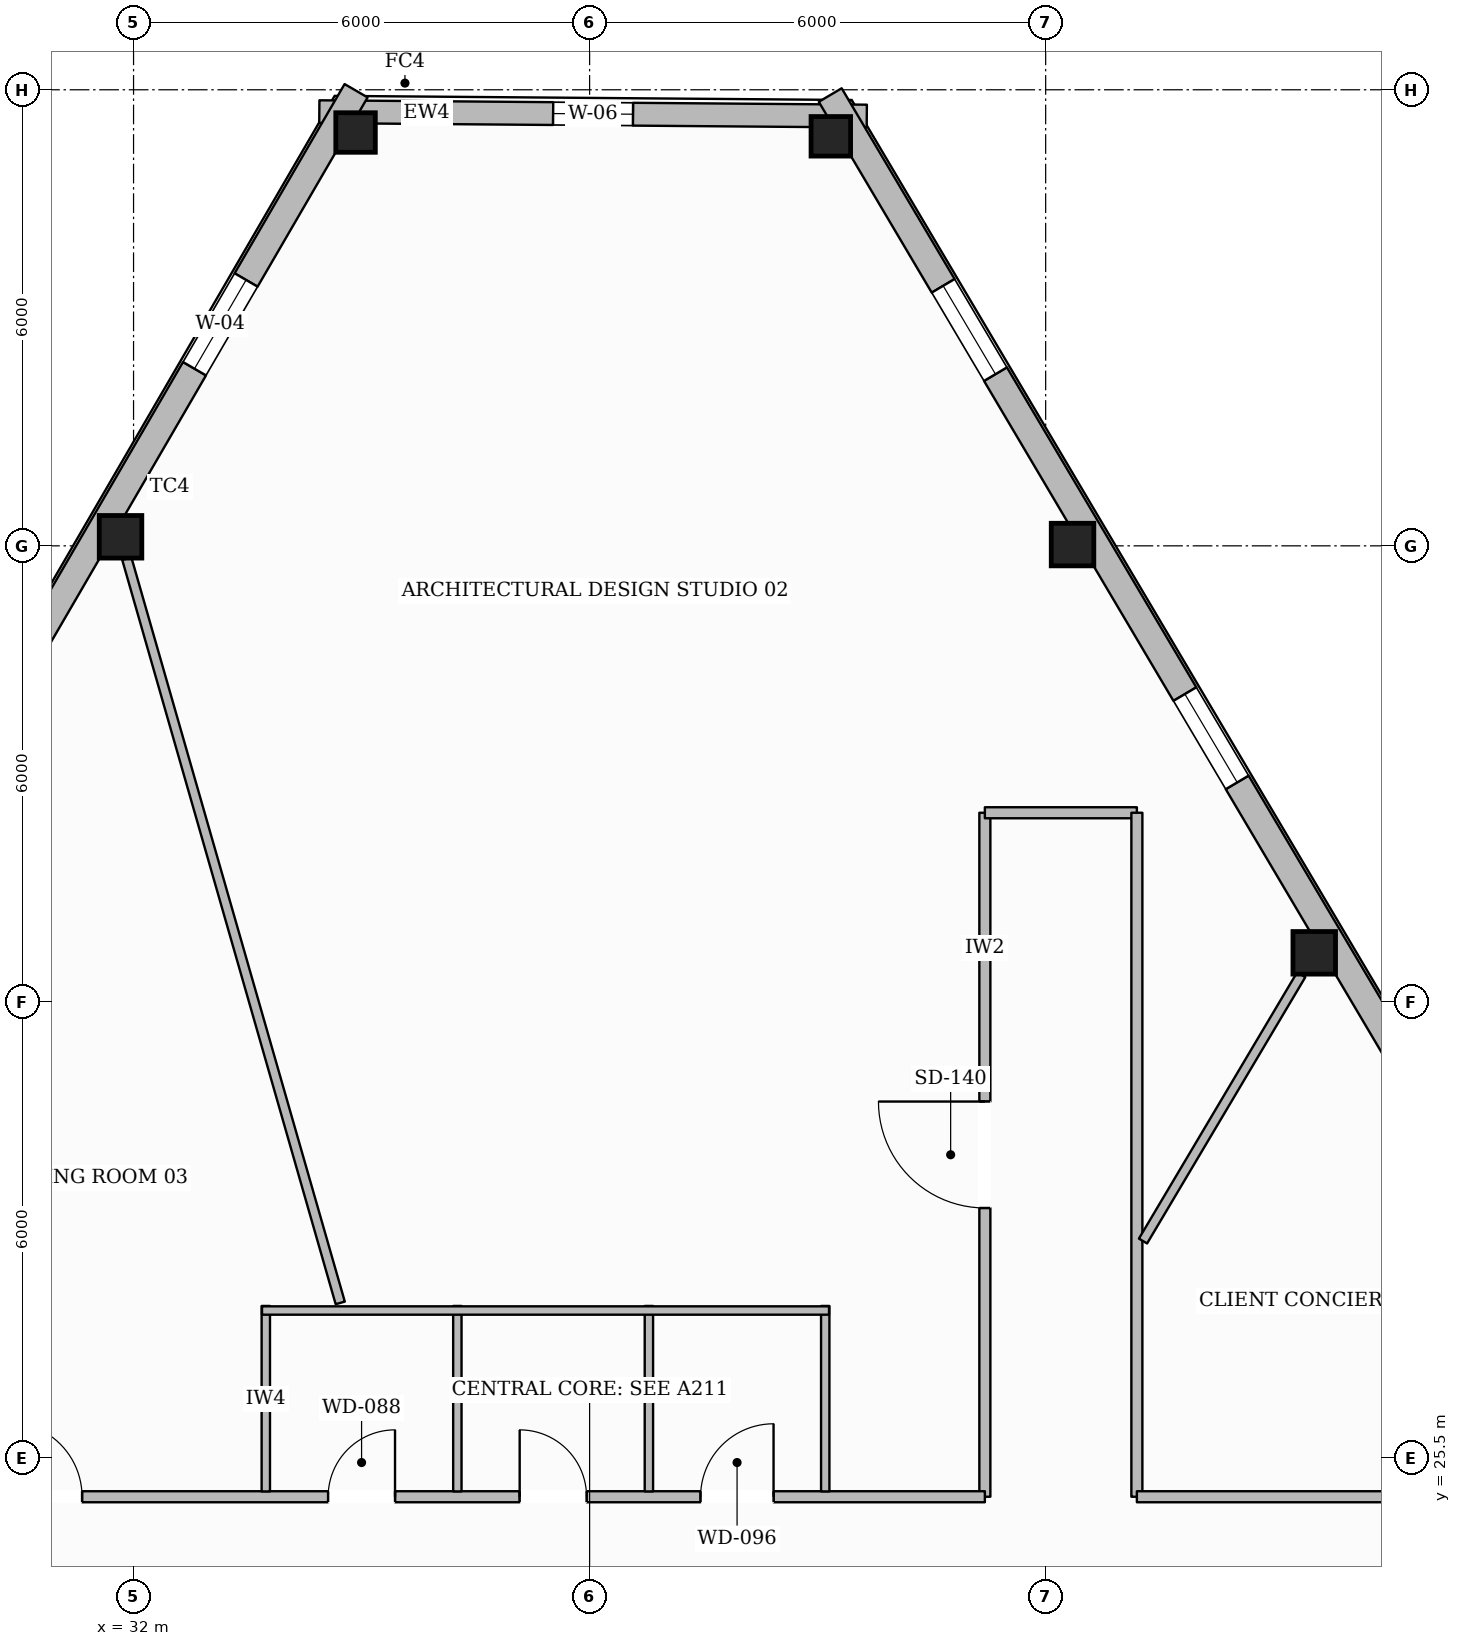
"""IFC4 building model, lengths in metres.
Left out: names, types, materials, properties, quantities, classifications, styles, units other than length and angle.
Written with IfcOpenShell. Run it as: python <this file> out.ifc"""

import sys

from ifc_helpers import new_model, si_unit, direction, frame, frame_2d, origin, origin_2d, place, context, subcontext, project, spatial, rectangle, hollow_rectangle, extrude, element, fill, save


model = new_model("IFC4")
c1 = context("Model", 3, precision=1e-05, world=origin(), true_north=direction((0.0, 1.0)))
c2 = subcontext(c1, "Body", "Model", "MODEL_VIEW")
j1 = project(units=[si_unit("LENGTHUNIT", "METRE"), si_unit("PLANEANGLEUNIT", "RADIAN")], contexts=[c1])
p1 = place(None, origin())
s1 = spatial("IfcSite", under=j1, at=p1, CompositionType="ELEMENT")
p2 = place(p1, origin())
s2 = spatial("IfcBuilding", under=s1, at=p2, CompositionType="ELEMENT")
p3 = place(p2, frame((0.0, 0.0, 266.45)))
s3 = spatial("IfcBuildingStorey", under=s2, at=p3, CompositionType="ELEMENT", Elevation=266.45)
p4 = place(p3, frame((34.921, 42.938, 0.0), z_axis=(0.0, 0.0, 1.0), x_axis=(1.0, 0.0, 0.0)))
e1 = element("IfcColumn", 1, at=p4, inside=s3, PredefinedType="COLUMN", context=c2, shape_type="SweptSolid", body=[
    extrude(hollow_rectangle(XDim=0.52, YDim=0.52, WallThickness=0.024, at=origin_2d()), origin(), (0.0, 0.0, 1.0), 3.61),
])
for number, where, z_axis, x_axis in (
    (2, (31.829, 37.619, 0.0), (0.0, 0.0, 1.0), (1.0, 0.0, 0.0)),
    (3, (47.533, 32.146, 0.0), (0.0, 0.0, 1.0), (1.0, 0.0, 0.0)),
    (4, (44.354, 37.517, 0.0), (0.0, 0.0, 1.0), (1.0, 0.0, 0.0)),
):
    element("IfcColumn", number, at=place(p3, frame(where, z_axis=z_axis, x_axis=x_axis)), inside=s3, PredefinedType="COLUMN", context=c2, shape_type="SweptSolid", body=[
        extrude(hollow_rectangle(XDim=0.56, YDim=0.56, WallThickness=0.025, at=origin_2d()), origin(), (0.0, 0.0, 1.0), 3.61),
    ])
p5 = place(p3, frame((41.173, 42.888, 0.0), z_axis=(0.0, 0.0, 1.0), x_axis=(1.0, 0.0, 0.0)))
e5 = element("IfcColumn", 5, at=p5, inside=s3, PredefinedType="COLUMN", context=c2, shape_type="SweptSolid", body=[
    extrude(hollow_rectangle(XDim=0.52, YDim=0.52, WallThickness=0.024, at=origin_2d()), origin(), (0.0, 0.0, 1.0), 3.61),
])
p6 = place(p3, frame((34.444, 43.211, 0.0), z_axis=(0.0, 0.0, 1.0), x_axis=(0.999968003705, -0.007999472861, 0.0)))
e6 = element("IfcWall", 6, at=p6, inside=s3, PredefinedType="STANDARD", context=c2, shape_type="SweptSolid", body=[
    extrude(rectangle(XDim=7.203, YDim=0.3, at=frame_2d((3.601, 0.0))), origin(), (0.0, 0.0, 1.0), 3.196),
])
p7 = place(p6, frame((3.076, 0.0, 0.65)))
e7 = element("IfcOpeningElement", 7, at=p7, cuts=e6, PredefinedType="OPENING", context=c2, shape_type="SweptSolid", body=[
    extrude(rectangle(XDim=1.05, YDim=1.7, at=frame_2d((0.525, 0.85))), frame((0.0, 0.16, 0.0), z_axis=(0.0, -1.0, 0.0), x_axis=(1.0, 0.0, 0.0)), (0.0, 0.0, 1.0), 0.32),
])
p8 = place(p3, frame((15.894, 10.745, 0.0), z_axis=(0.0, 0.0, 1.0), x_axis=(0.502581466224, 0.864529854781, 0.0)))
e8 = element("IfcWall", 8, at=p8, inside=s3, PredefinedType="STANDARD", context=c2, shape_type="SweptSolid", body=[
    extrude(rectangle(XDim=37.873, YDim=0.35, at=frame_2d((18.937, 0.0))), origin(), (0.0, 0.0, 1.0), 3.196),
])
p9 = place(p8, frame((33.643, 0.0, 0.65)))
e9 = element("IfcOpeningElement", 9, at=p9, cuts=e8, PredefinedType="OPENING", context=c2, shape_type="SweptSolid", body=[
    extrude(rectangle(XDim=1.35, YDim=1.75, at=frame_2d((0.675, 0.875))), frame((0.0, 0.185, 0.0), z_axis=(0.0, -1.0, 0.0), x_axis=(1.0, 0.0, 0.0)), (0.0, 0.0, 1.0), 0.37),
])
p10 = place(p8, frame((27.491, 0.0, 0.65)))
e10 = element("IfcOpeningElement", 10, at=p10, cuts=e8, PredefinedType="OPENING", context=c2, shape_type="SweptSolid", body=[
    extrude(rectangle(XDim=1.35, YDim=1.75, at=frame_2d((0.675, 0.875))), frame((0.0, 0.185, 0.0), z_axis=(0.0, -1.0, 0.0), x_axis=(1.0, 0.0, 0.0)), (0.0, 0.0, 1.0), 0.37),
])
p11 = place(p8, frame((15.187, 0.0, 0.65)))
e11 = element("IfcOpeningElement", 11, at=p11, cuts=e8, PredefinedType="OPENING", context=c2, shape_type="SweptSolid", body=[
    extrude(rectangle(XDim=1.35, YDim=1.75, at=frame_2d((0.675, 0.875))), frame((0.0, 0.185, 0.0), z_axis=(0.0, -1.0, 0.0), x_axis=(1.0, 0.0, 0.0)), (0.0, 0.0, 1.0), 0.37),
])
p12 = place(p8, frame((9.035, 0.0, 0.65)))
e12 = element("IfcOpeningElement", 12, at=p12, cuts=e8, PredefinedType="OPENING", context=c2, shape_type="SweptSolid", body=[
    extrude(rectangle(XDim=1.35, YDim=1.75, at=frame_2d((0.675, 0.875))), frame((0.0, 0.185, 0.0), z_axis=(0.0, -1.0, 0.0), x_axis=(1.0, 0.0, 0.0)), (0.0, 0.0, 1.0), 0.37),
])
p13 = place(p8, frame((2.883, 0.0, 0.65)))
e13 = element("IfcOpeningElement", 13, at=p13, cuts=e8, PredefinedType="OPENING", context=c2, shape_type="SweptSolid", body=[
    extrude(rectangle(XDim=1.35, YDim=1.75, at=frame_2d((0.675, 0.875))), frame((0.0, 0.185, 0.0), z_axis=(0.0, -1.0, 0.0), x_axis=(1.0, 0.0, 0.0)), (0.0, 0.0, 1.0), 0.37),
])
p14 = place(p3, frame((41.166, 43.431, 0.0), z_axis=(0.0, 0.0, 1.0), x_axis=(0.50946847144, -0.860489323936, 0.0)))
e14 = element("IfcWall", 14, at=p14, inside=s3, PredefinedType="STANDARD", context=c2, shape_type="SweptSolid", body=[
    extrude(rectangle(XDim=38.404, YDim=0.35, at=frame_2d((19.202, 0.0))), origin(), (0.0, 0.0, 1.0), 3.196),
])
p15 = place(p14, frame((34.126, 0.0, 0.65)))
e15 = element("IfcOpeningElement", 15, at=p15, cuts=e14, PredefinedType="OPENING", context=c2, shape_type="SweptSolid", body=[
    extrude(rectangle(XDim=1.35, YDim=1.75, at=frame_2d((0.675, 0.875))), frame((0.0, 0.185, 0.0), z_axis=(0.0, -1.0, 0.0), x_axis=(1.0, 0.0, 0.0)), (0.0, 0.0, 1.0), 0.37),
])
p16 = place(p14, frame((27.884, 0.0, 0.65)))
e16 = element("IfcOpeningElement", 16, at=p16, cuts=e14, PredefinedType="OPENING", context=c2, shape_type="SweptSolid", body=[
    extrude(rectangle(XDim=1.35, YDim=1.75, at=frame_2d((0.675, 0.875))), frame((0.0, 0.185, 0.0), z_axis=(0.0, -1.0, 0.0), x_axis=(1.0, 0.0, 0.0)), (0.0, 0.0, 1.0), 0.37),
])
p17 = place(p14, frame((15.401, 0.0, 0.65)))
e17 = element("IfcOpeningElement", 17, at=p17, cuts=e14, PredefinedType="OPENING", context=c2, shape_type="SweptSolid", body=[
    extrude(rectangle(XDim=1.35, YDim=1.75, at=frame_2d((0.675, 0.875))), frame((0.0, 0.185, 0.0), z_axis=(0.0, -1.0, 0.0), x_axis=(1.0, 0.0, 0.0)), (0.0, 0.0, 1.0), 0.37),
])
p18 = place(p14, frame((9.159, 0.0, 0.65)))
e18 = element("IfcOpeningElement", 18, at=p18, cuts=e14, PredefinedType="OPENING", context=c2, shape_type="SweptSolid", body=[
    extrude(rectangle(XDim=1.35, YDim=1.75, at=frame_2d((0.675, 0.875))), frame((0.0, 0.185, 0.0), z_axis=(0.0, -1.0, 0.0), x_axis=(1.0, 0.0, 0.0)), (0.0, 0.0, 1.0), 0.37),
])
p19 = place(p14, frame((2.917, 0.0, 0.65)))
e19 = element("IfcOpeningElement", 19, at=p19, cuts=e14, PredefinedType="OPENING", context=c2, shape_type="SweptSolid", body=[
    extrude(rectangle(XDim=1.35, YDim=1.75, at=frame_2d((0.675, 0.875))), frame((0.0, 0.185, 0.0), z_axis=(0.0, -1.0, 0.0), x_axis=(1.0, 0.0, 0.0)), (0.0, 0.0, 1.0), 0.37),
])
p20 = place(p3, frame((43.2, 24.99, 0.0), z_axis=(0.0, 0.0, 1.0), x_axis=(0.0, 1.0, 0.0)))
e20 = element("IfcWall", 20, at=p20, inside=s3, PredefinedType="PARTITIONING", context=c2, shape_type="SweptSolid", body=[
    extrude(rectangle(XDim=8.999, YDim=0.145, at=frame_2d((4.499, 0.0))), origin(), (0.0, 0.0, 1.0), 3.61),
])
p21 = place(p20, frame((3.799, 0.0, 0.0)))
e21 = element("IfcOpeningElement", 21, at=p21, cuts=e20, PredefinedType="OPENING", context=c2, shape_type="SweptSolid", body=[
    extrude(rectangle(XDim=1.4, YDim=2.2, at=frame_2d((0.7, 1.1))), frame((0.0, 0.083, 0.0), z_axis=(0.0, -1.0, 0.0), x_axis=(1.0, 0.0, 0.0)), (0.0, 0.0, 1.0), 0.165),
])
p22 = place(p3, frame((43.2, 33.989, 0.0), z_axis=(0.0, 0.0, 1.0), x_axis=(1.0, 0.0, 0.0)))
e22 = element("IfcWall", 22, at=p22, inside=s3, PredefinedType="PARTITIONING", context=c2, shape_type="SweptSolid", body=[
    extrude(rectangle(XDim=2.0, YDim=0.145, at=frame_2d((1.0, 0.0))), origin(), (0.0, 0.0, 1.0), 3.61),
])
p23 = place(p3, frame((45.2, 33.989, 0.0), z_axis=(0.0, 0.0, 1.0), x_axis=(0.0, -1.0, 0.0)))
e23 = element("IfcWall", 23, at=p23, inside=s3, PredefinedType="PARTITIONING", context=c2, shape_type="SweptSolid", body=[
    extrude(rectangle(XDim=8.999, YDim=0.145, at=frame_2d((4.499, 0.0))), origin(), (0.0, 0.0, 1.0), 3.61),
])
p24 = place(p3, frame((45.2, 24.99, 0.0), z_axis=(0.0, 0.0, 1.0), x_axis=(1.0, 0.0, 0.0)))
e24 = element("IfcWall", 24, at=p24, inside=s3, PredefinedType="PARTITIONING", context=c2, shape_type="SweptSolid", body=[
    extrude(rectangle(XDim=4.71, YDim=0.145, at=frame_2d((2.355, 0.0))), origin(), (0.0, 0.0, 1.0), 3.61),
])
p25 = place(p3, frame((26.09, 24.99, 0.0), z_axis=(0.0, 0.0, 1.0), x_axis=(1.0, 0.0, 0.0)))
e25 = element("IfcWall", 25, at=p25, inside=s3, PredefinedType="PARTITIONING", context=c2, shape_type="SweptSolid", body=[
    extrude(rectangle(XDim=17.11, YDim=0.145, at=frame_2d((8.555, 0.0))), origin(), (0.0, 0.0, 1.0), 3.61),
])
p26 = place(p25, frame((8.47, 0.0, 0.0)))
e26 = element("IfcOpeningElement", 26, at=p26, cuts=e25, PredefinedType="OPENING", context=c2, shape_type="SweptSolid", body=[
    extrude(rectangle(XDim=0.88, YDim=2.1, at=frame_2d((0.44, 1.05))), frame((0.0, 0.083, 0.0), z_axis=(0.0, -1.0, 0.0), x_axis=(1.0, 0.0, 0.0)), (0.0, 0.0, 1.0), 0.165),
])
p27 = place(p25, frame((10.99, 0.0, 0.0)))
e27 = element("IfcOpeningElement", 27, at=p27, cuts=e25, PredefinedType="OPENING", context=c2, shape_type="SweptSolid", body=[
    extrude(rectangle(XDim=0.88, YDim=2.1, at=frame_2d((0.44, 1.05))), frame((0.0, 0.083, 0.0), z_axis=(0.0, -1.0, 0.0), x_axis=(1.0, 0.0, 0.0)), (0.0, 0.0, 1.0), 0.165),
])
p28 = place(p25, frame((13.37, 0.0, 0.0)))
e28 = element("IfcOpeningElement", 28, at=p28, cuts=e25, PredefinedType="OPENING", context=c2, shape_type="SweptSolid", body=[
    extrude(rectangle(XDim=0.96, YDim=2.1, at=frame_2d((0.48, 1.05))), frame((0.0, 0.083, 0.0), z_axis=(0.0, -1.0, 0.0), x_axis=(1.0, 0.0, 0.0)), (0.0, 0.0, 1.0), 0.165),
])
p29 = place(p25, frame((4.253, 0.0, 0.0)))
e29 = element("IfcOpeningElement", 29, at=p29, cuts=e25, PredefinedType="OPENING", context=c2, shape_type="SweptSolid", body=[
    extrude(rectangle(XDim=0.98, YDim=2.15, at=frame_2d((0.49, 1.075))), frame((0.0, 0.083, 0.0), z_axis=(0.0, -1.0, 0.0), x_axis=(1.0, 0.0, 0.0)), (0.0, 0.0, 1.0), 0.165),
])
for number, where, z_axis, x_axis in (
    (30, (33.74, 25.06, 0.0), (0.0, 0.0, 1.0), (0.0, 1.0, 0.0)),
    (31, (36.26, 25.06, 0.0), (0.0, 0.0, 1.0), (0.0, 1.0, 0.0)),
    (32, (38.78, 25.06, 0.0), (0.0, 0.0, 1.0), (0.0, 1.0, 0.0)),
):
    element("IfcWall", number, at=place(p3, frame(where, z_axis=z_axis, x_axis=x_axis)), inside=s3, PredefinedType="PLUMBINGWALL", context=c2, shape_type="SweptSolid", body=[
        extrude(rectangle(XDim=2.44, YDim=0.11, at=frame_2d((1.22, 0.0))), origin(), (0.0, 0.0, 1.0), 3.61),
    ])
p30 = place(p3, frame((41.1, 25.06, 0.0), z_axis=(0.0, 0.0, 1.0), x_axis=(0.0, 1.0, 0.0)))
e33 = element("IfcWall", 33, at=p30, inside=s3, PredefinedType="PLUMBINGWALL", context=c2, shape_type="SweptSolid", body=[
    extrude(rectangle(XDim=2.44, YDim=0.11, at=frame_2d((1.22, 0.0))), origin(), (0.0, 0.0, 1.0), 3.246),
])
p31 = place(p3, frame((33.69, 27.44, 0.0), z_axis=(0.0, 0.0, 1.0), x_axis=(1.0, 0.0, 0.0)))
e34 = element("IfcWall", 34, at=p31, inside=s3, PredefinedType="PLUMBINGWALL", context=c2, shape_type="SweptSolid", body=[
    extrude(rectangle(XDim=7.46, YDim=0.11, at=frame_2d((3.73, 0.0))), origin(), (0.0, 0.0, 1.0), 3.61),
])
p32 = place(p3, frame((45.281, 28.354, 0.0), z_axis=(0.0, 0.0, 1.0), x_axis=(0.510808625208, 0.859694450612, 0.0)))
e35 = element("IfcWall", 35, at=p32, inside=s3, PredefinedType="PARTITIONING", context=c2, shape_type="SweptSolid", body=[
    extrude(rectangle(XDim=4.075, YDim=0.125, at=frame_2d((2.038, 0.0))), origin(), (0.0, 0.0, 1.0), 3.61),
])
p33 = place(p3, frame((34.719, 27.54, 0.0), z_axis=(0.0, 0.0, 1.0), x_axis=(-0.275667544418, 0.961253038983, 0.0)))
e36 = element("IfcWall", 36, at=p33, inside=s3, PredefinedType="PARTITIONING", context=c2, shape_type="SweptSolid", body=[
    extrude(rectangle(XDim=10.186, YDim=0.125, at=frame_2d((5.093, 0.0))), origin(), (0.0, 0.0, 1.0), 3.61),
])
p34 = place(p9, origin())
e37 = element("IfcWindow", 37, at=p34, inside=s3, PartitioningType="SINGLE_PANEL", PredefinedType="WINDOW", context=c2, shape_type="SweptSolid", body=[
    extrude(rectangle(XDim=1.35, YDim=1.75, at=frame_2d((0.675, 0.875))), frame((0.0, 0.03, 0.0), z_axis=(0.0, -1.0, 0.0), x_axis=(1.0, 0.0, 0.0)), (0.0, 0.0, 1.0), 0.06),
])
fill(e9, e37)
p35 = place(p18, origin())
e38 = element("IfcWindow", 38, at=p35, inside=s3, PartitioningType="SINGLE_PANEL", PredefinedType="WINDOW", context=c2, shape_type="SweptSolid", body=[
    extrude(rectangle(XDim=1.35, YDim=1.75, at=frame_2d((0.675, 0.875))), frame((0.0, 0.03, 0.0), z_axis=(0.0, -1.0, 0.0), x_axis=(1.0, 0.0, 0.0)), (0.0, 0.0, 1.0), 0.06),
])
fill(e18, e38)
p36 = place(p19, origin())
e39 = element("IfcWindow", 39, at=p36, inside=s3, PartitioningType="SINGLE_PANEL", PredefinedType="WINDOW", context=c2, shape_type="SweptSolid", body=[
    extrude(rectangle(XDim=1.35, YDim=1.75, at=frame_2d((0.675, 0.875))), frame((0.0, 0.03, 0.0), z_axis=(0.0, -1.0, 0.0), x_axis=(1.0, 0.0, 0.0)), (0.0, 0.0, 1.0), 0.06),
])
fill(e19, e39)
p37 = place(p7, origin())
e40 = element("IfcWindow", 40, at=p37, inside=s3, PartitioningType="SINGLE_PANEL", PredefinedType="WINDOW", context=c2, shape_type="SweptSolid", body=[
    extrude(rectangle(XDim=1.05, YDim=1.7, at=frame_2d((0.525, 0.85))), frame((0.0, 0.03, 0.0), z_axis=(0.0, -1.0, 0.0), x_axis=(1.0, 0.0, 0.0)), (0.0, 0.0, 1.0), 0.06),
])
fill(e7, e40)
p38 = place(p26, origin())
e41 = element("IfcDoor", 41, at=p38, inside=s3, OperationType="SINGLE_SWING_RIGHT", PredefinedType="DOOR", context=c2, shape_type="SweptSolid", body=[
    extrude(rectangle(XDim=0.88, YDim=2.1, at=frame_2d((0.44, 1.05))), frame((0.0, 0.025, 0.0), z_axis=(0.0, -1.0, 0.0), x_axis=(1.0, 0.0, 0.0)), (0.0, 0.0, 1.0), 0.05),
])
fill(e26, e41)
p39 = place(p27, origin())
e42 = element("IfcDoor", 42, at=p39, inside=s3, OperationType="SINGLE_SWING_LEFT", PredefinedType="DOOR", context=c2, shape_type="SweptSolid", body=[
    extrude(rectangle(XDim=0.88, YDim=2.1, at=frame_2d((0.44, 1.05))), frame((0.0, 0.025, 0.0), z_axis=(0.0, -1.0, 0.0), x_axis=(1.0, 0.0, 0.0)), (0.0, 0.0, 1.0), 0.05),
])
fill(e27, e42)
p40 = place(p28, origin())
e43 = element("IfcDoor", 43, at=p40, inside=s3, OperationType="SINGLE_SWING_RIGHT", PredefinedType="DOOR", context=c2, shape_type="SweptSolid", body=[
    extrude(rectangle(XDim=0.96, YDim=2.1, at=frame_2d((0.48, 1.05))), frame((0.0, 0.025, 0.0), z_axis=(0.0, -1.0, 0.0), x_axis=(1.0, 0.0, 0.0)), (0.0, 0.0, 1.0), 0.05),
])
fill(e28, e43)
p41 = place(p21, origin())
e44 = element("IfcDoor", 44, at=p41, inside=s3, OperationType="SINGLE_SWING_RIGHT", PredefinedType="DOOR", context=c2, shape_type="SweptSolid", body=[
    extrude(rectangle(XDim=1.4, YDim=2.2, at=frame_2d((0.7, 1.1))), frame((0.0, 0.025, 0.0), z_axis=(0.0, -1.0, 0.0), x_axis=(1.0, 0.0, 0.0)), (0.0, 0.0, 1.0), 0.05),
])
fill(e21, e44)
p42 = place(p29, origin())
e45 = element("IfcDoor", 45, at=p42, inside=s3, OperationType="SINGLE_SWING_LEFT", PredefinedType="DOOR", context=c2, shape_type="SweptSolid", body=[
    extrude(rectangle(XDim=0.98, YDim=2.15, at=frame_2d((0.49, 1.075))), frame((0.0, 0.025, 0.0), z_axis=(0.0, -1.0, 0.0), x_axis=(1.0, 0.0, 0.0)), (0.0, 0.0, 1.0), 0.05),
])
fill(e29, e45)
save(model, sys.argv[1])
